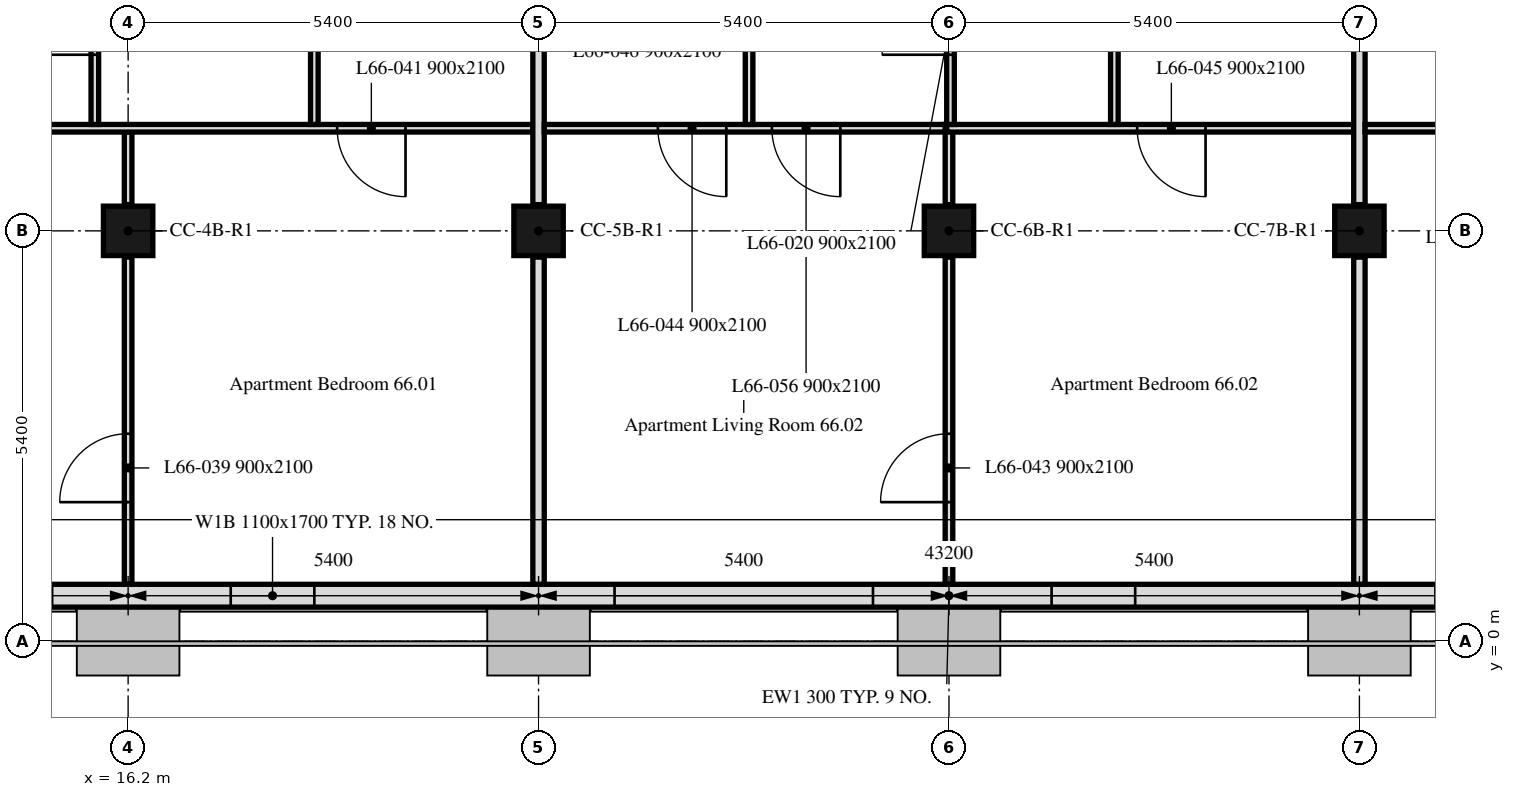
"""IFC4 building model, lengths in metres.
Left out: names, types, materials, properties, quantities, classifications, styles, units other than length and angle.
Written with IfcOpenShell. Run it as: python <this file> out.ifc"""

import sys

from ifc_helpers import new_model, si_unit, direction, frame, frame_2d, origin, origin_2d, place, context, subcontext, project, spatial, rectangle, extrude, element, fill, save


model = new_model("IFC4")
c1 = context("Model", 3, precision=1e-05, world=origin(), true_north=direction((0.0, 1.0)))
c2 = subcontext(c1, "Body", "Model", "MODEL_VIEW")
j1 = project(units=[si_unit("LENGTHUNIT", "METRE"), si_unit("PLANEANGLEUNIT", "RADIAN")], contexts=[c1])
p1 = place(None, origin())
s1 = spatial("IfcSite", under=j1, at=p1, CompositionType="ELEMENT")
p2 = place(p1, origin())
s2 = spatial("IfcBuilding", under=s1, at=p2, CompositionType="ELEMENT")
p3 = place(p2, frame((0.0, 0.0, 271.9)))
s3 = spatial("IfcBuildingStorey", under=s2, at=p3, CompositionType="ELEMENT", Elevation=271.9)
for number, where, z_axis, x_axis in (
    (1, (16.2, 5.4, 0.0), (0.0, 0.0, 1.0), (1.0, 0.0, 0.0)),
    (2, (21.6, 5.4, 0.0), (0.0, 0.0, 1.0), (1.0, 0.0, 0.0)),
    (3, (27.0, 5.4, 0.0), (0.0, 0.0, 1.0), (1.0, 0.0, 0.0)),
    (4, (32.4, 5.4, 0.0), (0.0, 0.0, 1.0), (1.0, 0.0, 0.0)),
):
    element("IfcColumn", number, at=place(p3, frame(where, z_axis=z_axis, x_axis=x_axis)), inside=s3, PredefinedType="COLUMN", context=c2, shape_type="SweptSolid", body=[
        extrude(rectangle(XDim=0.65, YDim=0.65, at=origin_2d()), origin(), (0.0, 0.0, 1.0), 3.0),
    ])
p4 = place(p3, frame((10.986, 0.6, 0.0), z_axis=(0.0, 0.0, 1.0), x_axis=(1.0, 0.0, 0.0)))
e5 = element("IfcWall", 5, at=p4, inside=s3, PredefinedType="SOLIDWALL", context=c2, shape_type="SweptSolid", body=[
    extrude(rectangle(XDim=32.027, YDim=0.3, at=frame_2d((16.014, 0.0))), origin(), (0.0, 0.0, 1.0), 3.0),
])
p5 = place(p4, frame((0.814, 0.0, 0.9)))
e6 = element("IfcOpeningElement", 6, at=p5, cuts=e5, PredefinedType="OPENING", context=c2, shape_type="SweptSolid", body=[
    extrude(rectangle(XDim=3.4, YDim=1.7, at=frame_2d((1.7, 0.85))), frame((0.0, 0.16, 0.0), z_axis=(0.0, -1.0, 0.0), x_axis=(1.0, 0.0, 0.0)), (0.0, 0.0, 1.0), 0.32),
])
p6 = place(p4, frame((6.564, 0.0, 0.9)))
e7 = element("IfcOpeningElement", 7, at=p6, cuts=e5, PredefinedType="OPENING", context=c2, shape_type="SweptSolid", body=[
    extrude(rectangle(XDim=1.1, YDim=1.7, at=frame_2d((0.55, 0.85))), frame((0.0, 0.16, 0.0), z_axis=(0.0, -1.0, 0.0), x_axis=(1.0, 0.0, 0.0)), (0.0, 0.0, 1.0), 0.32),
])
p7 = place(p4, frame((11.614, 0.0, 0.9)))
e8 = element("IfcOpeningElement", 8, at=p7, cuts=e5, PredefinedType="OPENING", context=c2, shape_type="SweptSolid", body=[
    extrude(rectangle(XDim=3.4, YDim=1.7, at=frame_2d((1.7, 0.85))), frame((0.0, 0.16, 0.0), z_axis=(0.0, -1.0, 0.0), x_axis=(1.0, 0.0, 0.0)), (0.0, 0.0, 1.0), 0.32),
])
p8 = place(p4, frame((17.364, 0.0, 0.9)))
e9 = element("IfcOpeningElement", 9, at=p8, cuts=e5, PredefinedType="OPENING", context=c2, shape_type="SweptSolid", body=[
    extrude(rectangle(XDim=1.1, YDim=1.7, at=frame_2d((0.55, 0.85))), frame((0.0, 0.16, 0.0), z_axis=(0.0, -1.0, 0.0), x_axis=(1.0, 0.0, 0.0)), (0.0, 0.0, 1.0), 0.32),
])
p9 = place(p4, frame((22.414, 0.0, 0.9)))
e10 = element("IfcOpeningElement", 10, at=p9, cuts=e5, PredefinedType="OPENING", context=c2, shape_type="SweptSolid", body=[
    extrude(rectangle(XDim=3.4, YDim=1.7, at=frame_2d((1.7, 0.85))), frame((0.0, 0.16, 0.0), z_axis=(0.0, -1.0, 0.0), x_axis=(1.0, 0.0, 0.0)), (0.0, 0.0, 1.0), 0.32),
])
p10 = place(p4, frame((28.164, 0.0, 0.9)))
e11 = element("IfcOpeningElement", 11, at=p10, cuts=e5, PredefinedType="OPENING", context=c2, shape_type="SweptSolid", body=[
    extrude(rectangle(XDim=1.1, YDim=1.7, at=frame_2d((0.55, 0.85))), frame((0.0, 0.16, 0.0), z_axis=(0.0, -1.0, 0.0), x_axis=(1.0, 0.0, 0.0)), (0.0, 0.0, 1.0), 0.32),
])
p11 = place(p3, frame((16.2, 0.751, 0.0), z_axis=(0.0, 0.0, 1.0), x_axis=(0.0, 1.0, 0.0)))
e12 = element("IfcWall", 12, at=p11, inside=s3, PredefinedType="PARTITIONING", context=c2, shape_type="SweptSolid", body=[
    extrude(rectangle(XDim=4.304, YDim=0.1, at=frame_2d((2.152, 0.0))), origin(), (0.0, 0.0, 1.0), 2.4),
])
p12 = place(p11, frame((1.08, 0.0, 0.0)))
e13 = element("IfcOpeningElement", 13, at=p12, cuts=e12, PredefinedType="OPENING", context=c2, shape_type="SweptSolid", body=[
    extrude(rectangle(XDim=0.9, YDim=2.1, at=frame_2d((0.45, 1.05))), frame((0.0, 0.05, 0.0), z_axis=(0.0, -1.0, 0.0), x_axis=(1.0, 0.0, 0.0)), (0.0, 0.0, 1.0), 0.1),
])
p13 = place(p3, frame((16.2, 5.745, 0.0), z_axis=(0.0, 0.0, 1.0), x_axis=(0.0, 1.0, 0.0)))
e14 = element("IfcWall", 14, at=p13, inside=s3, PredefinedType="PARTITIONING", context=c2, shape_type="SweptSolid", body=[
    extrude(rectangle(XDim=0.955, YDim=0.1, at=frame_2d((0.478, 0.0))), origin(), (0.0, 0.0, 1.0), 2.4),
])
p14 = place(p3, frame((21.525, 6.75, 0.0), z_axis=(0.0, 0.0, 1.0), x_axis=(-1.0, 0.0, 0.0)))
e15 = element("IfcWall", 15, at=p14, inside=s3, PredefinedType="PARTITIONING", context=c2, shape_type="SweptSolid", body=[
    extrude(rectangle(XDim=10.65, YDim=0.1, at=frame_2d((5.325, 0.0))), origin(), (0.0, 0.0, 1.0), 2.4),
])
p15 = place(p14, frame((8.813, 0.0, 0.0)))
e16 = element("IfcOpeningElement", 16, at=p15, cuts=e15, PredefinedType="OPENING", context=c2, shape_type="SweptSolid", body=[
    extrude(rectangle(XDim=0.9, YDim=2.1, at=frame_2d((0.45, 1.05))), frame((0.0, 0.05, 0.0), z_axis=(0.0, -1.0, 0.0), x_axis=(1.0, 0.0, 0.0)), (0.0, 0.0, 1.0), 0.1),
])
p16 = place(p14, frame((1.675, 0.0, 0.0)))
e17 = element("IfcOpeningElement", 17, at=p16, cuts=e15, PredefinedType="OPENING", context=c2, shape_type="SweptSolid", body=[
    extrude(rectangle(XDim=0.9, YDim=2.1, at=frame_2d((0.45, 1.05))), frame((0.0, 0.05, 0.0), z_axis=(0.0, -1.0, 0.0), x_axis=(1.0, 0.0, 0.0)), (0.0, 0.0, 1.0), 0.1),
])
p17 = place(p14, frame((7.313, 0.0, 0.0)))
e18 = element("IfcOpeningElement", 18, at=p17, cuts=e15, PredefinedType="OPENING", context=c2, shape_type="SweptSolid", body=[
    extrude(rectangle(XDim=0.9, YDim=2.1, at=frame_2d((0.45, 1.05))), frame((0.0, 0.05, 0.0), z_axis=(0.0, -1.0, 0.0), x_axis=(1.0, 0.0, 0.0)), (0.0, 0.0, 1.0), 0.1),
])
p18 = place(p3, frame((21.6, 0.751, 0.0), z_axis=(0.0, 0.0, 1.0), x_axis=(0.0, 1.0, 0.0)))
e19 = element("IfcWall", 19, at=p18, inside=s3, PredefinedType="PARTITIONING", context=c2, shape_type="SweptSolid", body=[
    extrude(rectangle(XDim=4.304, YDim=0.15, at=frame_2d((2.152, 0.0))), origin(), (0.0, 0.0, 1.0), 2.4),
])
p19 = place(p3, frame((15.762, 6.8, 0.0), z_axis=(0.0, 0.0, 1.0), x_axis=(0.0, 1.0, 0.0)))
e20 = element("IfcWall", 20, at=p19, inside=s3, PredefinedType="PARTITIONING", context=c2, shape_type="SweptSolid", body=[
    extrude(rectangle(XDim=7.075, YDim=0.1, at=frame_2d((3.538, 0.0))), origin(), (0.0, 0.0, 1.0), 3.0),
])
p20 = place(p19, frame((0.917, 0.0, 0.0)))
e21 = element("IfcOpeningElement", 21, at=p20, cuts=e20, PredefinedType="OPENING", context=c2, shape_type="SweptSolid", body=[
    extrude(rectangle(XDim=0.9, YDim=2.1, at=frame_2d((0.45, 1.05))), frame((0.0, 0.05, 0.0), z_axis=(0.0, -1.0, 0.0), x_axis=(1.0, 0.0, 0.0)), (0.0, 0.0, 1.0), 0.1),
])
p21 = place(p19, frame((5.925, 0.0, 0.0)))
e22 = element("IfcOpeningElement", 22, at=p21, cuts=e20, PredefinedType="OPENING", context=c2, shape_type="SweptSolid", body=[
    extrude(rectangle(XDim=0.9, YDim=2.1, at=frame_2d((0.45, 1.05))), frame((0.0, 0.05, 0.0), z_axis=(0.0, -1.0, 0.0), x_axis=(1.0, 0.0, 0.0)), (0.0, 0.0, 1.0), 0.1),
])
p22 = place(p3, frame((18.65, 6.8, 0.0), z_axis=(0.0, 0.0, 1.0), x_axis=(0.0, 1.0, 0.0)))
e23 = element("IfcWall", 23, at=p22, inside=s3, PredefinedType="PARTITIONING", context=c2, shape_type="SweptSolid", body=[
    extrude(rectangle(XDim=7.075, YDim=0.1, at=frame_2d((3.538, 0.0))), origin(), (0.0, 0.0, 1.0), 3.0),
])
p23 = place(p3, frame((21.6, 5.745, 0.0), z_axis=(0.0, 0.0, 1.0), x_axis=(0.0, 1.0, 0.0)))
e24 = element("IfcWall", 24, at=p23, inside=s3, PredefinedType="PARTITIONING", context=c2, shape_type="SweptSolid", body=[
    extrude(rectangle(XDim=4.71, YDim=0.15, at=frame_2d((2.355, 0.0))), origin(), (0.0, 0.0, 1.0), 2.4),
])
p24 = place(p3, frame((27.0, 0.751, 0.0), z_axis=(0.0, 0.0, 1.0), x_axis=(0.0, 1.0, 0.0)))
e25 = element("IfcWall", 25, at=p24, inside=s3, PredefinedType="PARTITIONING", context=c2, shape_type="SweptSolid", body=[
    extrude(rectangle(XDim=4.304, YDim=0.1, at=frame_2d((2.152, 0.0))), origin(), (0.0, 0.0, 1.0), 2.4),
])
p25 = place(p24, frame((1.08, 0.0, 0.0)))
e26 = element("IfcOpeningElement", 26, at=p25, cuts=e25, PredefinedType="OPENING", context=c2, shape_type="SweptSolid", body=[
    extrude(rectangle(XDim=0.9, YDim=2.1, at=frame_2d((0.45, 1.05))), frame((0.0, 0.05, 0.0), z_axis=(0.0, -1.0, 0.0), x_axis=(1.0, 0.0, 0.0)), (0.0, 0.0, 1.0), 0.1),
])
p26 = place(p3, frame((27.0, 5.745, 0.0), z_axis=(0.0, 0.0, 1.0), x_axis=(0.0, 1.0, 0.0)))
e27 = element("IfcWall", 27, at=p26, inside=s3, PredefinedType="PARTITIONING", context=c2, shape_type="SweptSolid", body=[
    extrude(rectangle(XDim=1.055, YDim=0.1, at=frame_2d((0.527, 0.0))), origin(), (0.0, 0.0, 1.0), 2.4),
])
p27 = place(p3, frame((26.95, 6.75, 0.0), z_axis=(0.0, 0.0, 1.0), x_axis=(-1.0, 0.0, 0.0)))
e28 = element("IfcWall", 28, at=p27, inside=s3, PredefinedType="PARTITIONING", context=c2, shape_type="SweptSolid", body=[
    extrude(rectangle(XDim=5.275, YDim=0.1, at=frame_2d((2.637, 0.0))), origin(), (0.0, 0.0, 1.0), 3.0),
])
p28 = place(p27, frame((2.88, 0.0, 0.0)))
e29 = element("IfcOpeningElement", 29, at=p28, cuts=e28, PredefinedType="OPENING", context=c2, shape_type="SweptSolid", body=[
    extrude(rectangle(XDim=0.9, YDim=2.1, at=frame_2d((0.45, 1.05))), frame((0.0, 0.05, 0.0), z_axis=(0.0, -1.0, 0.0), x_axis=(1.0, 0.0, 0.0)), (0.0, 0.0, 1.0), 0.1),
])
p29 = place(p27, frame((1.38, 0.0, 0.0)))
e30 = element("IfcOpeningElement", 30, at=p29, cuts=e28, PredefinedType="OPENING", context=c2, shape_type="SweptSolid", body=[
    extrude(rectangle(XDim=0.9, YDim=2.1, at=frame_2d((0.45, 1.05))), frame((0.0, 0.05, 0.0), z_axis=(0.0, -1.0, 0.0), x_axis=(1.0, 0.0, 0.0)), (0.0, 0.0, 1.0), 0.1),
])
p30 = place(p3, frame((32.4, 0.751, 0.0), z_axis=(0.0, 0.0, 1.0), x_axis=(0.0, 1.0, 0.0)))
e31 = element("IfcWall", 31, at=p30, inside=s3, PredefinedType="PARTITIONING", context=c2, shape_type="SweptSolid", body=[
    extrude(rectangle(XDim=4.304, YDim=0.15, at=frame_2d((2.152, 0.0))), origin(), (0.0, 0.0, 1.0), 2.4),
])
p31 = place(p3, frame((32.325, 6.75, 0.0), z_axis=(0.0, 0.0, 1.0), x_axis=(-1.0, 0.0, 0.0)))
e32 = element("IfcWall", 32, at=p31, inside=s3, PredefinedType="PARTITIONING", context=c2, shape_type="SweptSolid", body=[
    extrude(rectangle(XDim=5.355, YDim=0.1, at=frame_2d((2.677, 0.0))), origin(), (0.0, 0.0, 1.0), 3.0),
])
p32 = place(p31, frame((1.949, 0.0, 0.0)))
e33 = element("IfcOpeningElement", 33, at=p32, cuts=e32, PredefinedType="OPENING", context=c2, shape_type="SweptSolid", body=[
    extrude(rectangle(XDim=0.9, YDim=2.1, at=frame_2d((0.45, 1.05))), frame((0.0, 0.05, 0.0), z_axis=(0.0, -1.0, 0.0), x_axis=(1.0, 0.0, 0.0)), (0.0, 0.0, 1.0), 0.1),
])
p33 = place(p3, frame((24.37, 6.8, 0.0), z_axis=(0.0, 0.0, 1.0), x_axis=(0.0, 1.0, 0.0)))
e34 = element("IfcWall", 34, at=p33, inside=s3, PredefinedType="PARTITIONING", context=c2, shape_type="SweptSolid", body=[
    extrude(rectangle(XDim=7.075, YDim=0.1, at=frame_2d((3.538, 0.0))), origin(), (0.0, 0.0, 1.0), 3.0),
])
p34 = place(p33, frame((5.45, 0.0, 0.0)))
e35 = element("IfcOpeningElement", 35, at=p34, cuts=e34, PredefinedType="OPENING", context=c2, shape_type="SweptSolid", body=[
    extrude(rectangle(XDim=0.9, YDim=2.1, at=frame_2d((0.45, 1.05))), frame((0.0, 0.05, 0.0), z_axis=(0.0, -1.0, 0.0), x_axis=(1.0, 0.0, 0.0)), (0.0, 0.0, 1.0), 0.1),
])
p35 = place(p33, frame((1.85, 0.0, 0.0)))
e36 = element("IfcOpeningElement", 36, at=p35, cuts=e34, PredefinedType="OPENING", context=c2, shape_type="SweptSolid", body=[
    extrude(rectangle(XDim=0.9, YDim=2.1, at=frame_2d((0.45, 1.05))), frame((0.0, 0.05, 0.0), z_axis=(0.0, -1.0, 0.0), x_axis=(1.0, 0.0, 0.0)), (0.0, 0.0, 1.0), 0.1),
])
p36 = place(p3, frame((27.02, 6.8, 0.0), z_axis=(0.0, 0.0, 1.0), x_axis=(0.0, 1.0, 0.0)))
e37 = element("IfcWall", 37, at=p36, inside=s3, PredefinedType="PARTITIONING", context=c2, shape_type="SweptSolid", body=[
    extrude(rectangle(XDim=3.655, YDim=0.1, at=frame_2d((1.828, 0.0))), origin(), (0.0, 0.0, 1.0), 2.4),
])
p37 = place(p36, frame((0.917, 0.0, 0.0)))
e38 = element("IfcOpeningElement", 38, at=p37, cuts=e37, PredefinedType="OPENING", context=c2, shape_type="SweptSolid", body=[
    extrude(rectangle(XDim=0.9, YDim=2.1, at=frame_2d((0.45, 1.05))), frame((0.0, 0.05, 0.0), z_axis=(0.0, -1.0, 0.0), x_axis=(1.0, 0.0, 0.0)), (0.0, 0.0, 1.0), 0.1),
])
p38 = place(p3, frame((29.176, 6.8, 0.0), z_axis=(0.0, 0.0, 1.0), x_axis=(0.0, 1.0, 0.0)))
e39 = element("IfcWall", 39, at=p38, inside=s3, PredefinedType="PARTITIONING", context=c2, shape_type="SweptSolid", body=[
    extrude(rectangle(XDim=7.075, YDim=0.1, at=frame_2d((3.538, 0.0))), origin(), (0.0, 0.0, 1.0), 3.0),
])
p39 = place(p3, frame((32.4, 5.745, 0.0), z_axis=(0.0, 0.0, 1.0), x_axis=(0.0, 1.0, 0.0)))
e40 = element("IfcWall", 40, at=p39, inside=s3, PredefinedType="PARTITIONING", context=c2, shape_type="SweptSolid", body=[
    extrude(rectangle(XDim=4.71, YDim=0.15, at=frame_2d((2.355, 0.0))), origin(), (0.0, 0.0, 1.0), 2.4),
])
p40 = place(p3, frame((47.849, 6.75, 0.0), z_axis=(0.0, 0.0, 1.0), x_axis=(-1.0, 0.0, 0.0)))
e41 = element("IfcWall", 41, at=p40, inside=s3, PredefinedType="PARTITIONING", context=c2, shape_type="SweptSolid", body=[
    extrude(rectangle(XDim=15.374, YDim=0.1, at=frame_2d((7.687, 0.0))), origin(), (0.0, 0.0, 1.0), 2.4),
])
p41 = place(p40, frame((0.929, 0.0, 0.0)))
e42 = element("IfcOpeningElement", 42, at=p41, cuts=e41, PredefinedType="OPENING", context=c2, shape_type="SweptSolid", body=[
    extrude(rectangle(XDim=0.9, YDim=2.1, at=frame_2d((0.45, 1.05))), frame((0.0, 0.05, 0.0), z_axis=(0.0, -1.0, 0.0), x_axis=(1.0, 0.0, 0.0)), (0.0, 0.0, 1.0), 0.1),
])
p42 = place(p40, frame((13.149, 0.0, 0.0)))
e43 = element("IfcOpeningElement", 43, at=p42, cuts=e41, PredefinedType="OPENING", context=c2, shape_type="SweptSolid", body=[
    extrude(rectangle(XDim=0.9, YDim=2.1, at=frame_2d((0.45, 1.05))), frame((0.0, 0.05, 0.0), z_axis=(0.0, -1.0, 0.0), x_axis=(1.0, 0.0, 0.0)), (0.0, 0.0, 1.0), 0.1),
])
p43 = place(p40, frame((2.874, 0.0, 0.0)))
e44 = element("IfcOpeningElement", 44, at=p43, cuts=e41, PredefinedType="OPENING", context=c2, shape_type="SweptSolid", body=[
    extrude(rectangle(XDim=0.9, YDim=2.1, at=frame_2d((0.45, 1.05))), frame((0.0, 0.05, 0.0), z_axis=(0.0, -1.0, 0.0), x_axis=(1.0, 0.0, 0.0)), (0.0, 0.0, 1.0), 0.1),
])
p44 = place(p40, frame((8.463, 0.0, 0.0)))
e45 = element("IfcOpeningElement", 45, at=p44, cuts=e41, PredefinedType="OPENING", context=c2, shape_type="SweptSolid", body=[
    extrude(rectangle(XDim=0.9, YDim=2.1, at=frame_2d((0.45, 1.05))), frame((0.0, 0.05, 0.0), z_axis=(0.0, -1.0, 0.0), x_axis=(1.0, 0.0, 0.0)), (0.0, 0.0, 1.0), 0.1),
])
p45 = place(p6, origin())
e46 = element("IfcWindow", 46, at=p45, inside=s3, PartitioningType="SINGLE_PANEL", PredefinedType="WINDOW", context=c2, shape_type="SweptSolid", body=[
    extrude(rectangle(XDim=1.1, YDim=1.7, at=frame_2d((0.55, 0.85))), frame((0.0, 0.03, 0.0), z_axis=(0.0, -1.0, 0.0), x_axis=(1.0, 0.0, 0.0)), (0.0, 0.0, 1.0), 0.06),
])
fill(e7, e46)
p46 = place(p7, origin())
e47 = element("IfcWindow", 47, at=p46, inside=s3, PartitioningType="SINGLE_PANEL", PredefinedType="WINDOW", context=c2, shape_type="SweptSolid", body=[
    extrude(rectangle(XDim=3.4, YDim=1.7, at=frame_2d((1.7, 0.85))), frame((0.0, 0.03, 0.0), z_axis=(0.0, -1.0, 0.0), x_axis=(1.0, 0.0, 0.0)), (0.0, 0.0, 1.0), 0.06),
])
fill(e8, e47)
p47 = place(p8, origin())
e48 = element("IfcWindow", 48, at=p47, inside=s3, PartitioningType="SINGLE_PANEL", PredefinedType="WINDOW", context=c2, shape_type="SweptSolid", body=[
    extrude(rectangle(XDim=1.1, YDim=1.7, at=frame_2d((0.55, 0.85))), frame((0.0, 0.03, 0.0), z_axis=(0.0, -1.0, 0.0), x_axis=(1.0, 0.0, 0.0)), (0.0, 0.0, 1.0), 0.06),
])
fill(e9, e48)
p48 = place(p20, origin())
e49 = element("IfcDoor", 49, at=p48, inside=s3, OperationType="SINGLE_SWING_RIGHT", PredefinedType="DOOR", context=c2, shape_type="SweptSolid", body=[
    extrude(rectangle(XDim=0.9, YDim=2.1, at=frame_2d((0.45, 1.05))), frame((0.0, 0.025, 0.0), z_axis=(0.0, -1.0, 0.0), x_axis=(1.0, 0.0, 0.0)), (0.0, 0.0, 1.0), 0.05),
])
fill(e21, e49)
p49 = place(p37, origin())
e50 = element("IfcDoor", 50, at=p49, inside=s3, OperationType="SINGLE_SWING_LEFT", PredefinedType="DOOR", context=c2, shape_type="SweptSolid", body=[
    extrude(rectangle(XDim=0.9, YDim=2.1, at=frame_2d((0.45, 1.05))), frame((0.0, 0.025, 0.0), z_axis=(0.0, -1.0, 0.0), x_axis=(1.0, 0.0, 0.0)), (0.0, 0.0, 1.0), 0.05),
])
fill(e38, e50)
p50 = place(p12, origin())
e51 = element("IfcDoor", 51, at=p50, inside=s3, OperationType="SINGLE_SWING_LEFT", PredefinedType="DOOR", context=c2, shape_type="SweptSolid", body=[
    extrude(rectangle(XDim=0.9, YDim=2.1, at=frame_2d((0.45, 1.05))), frame((0.0, 0.025, 0.0), z_axis=(0.0, -1.0, 0.0), x_axis=(1.0, 0.0, 0.0)), (0.0, 0.0, 1.0), 0.05),
])
fill(e13, e51)
p51 = place(p16, origin())
e52 = element("IfcDoor", 52, at=p51, inside=s3, OperationType="SINGLE_SWING_LEFT", PredefinedType="DOOR", context=c2, shape_type="SweptSolid", body=[
    extrude(rectangle(XDim=0.9, YDim=2.1, at=frame_2d((0.45, 1.05))), frame((0.0, 0.025, 0.0), z_axis=(0.0, -1.0, 0.0), x_axis=(1.0, 0.0, 0.0)), (0.0, 0.0, 1.0), 0.05),
])
fill(e17, e52)
p52 = place(p25, origin())
e53 = element("IfcDoor", 53, at=p52, inside=s3, OperationType="SINGLE_SWING_RIGHT", PredefinedType="DOOR", context=c2, shape_type="SweptSolid", body=[
    extrude(rectangle(XDim=0.9, YDim=2.1, at=frame_2d((0.45, 1.05))), frame((0.0, 0.025, 0.0), z_axis=(0.0, -1.0, 0.0), x_axis=(1.0, 0.0, 0.0)), (0.0, 0.0, 1.0), 0.05),
])
fill(e26, e53)
p53 = place(p28, origin())
e54 = element("IfcDoor", 54, at=p53, inside=s3, OperationType="SINGLE_SWING_RIGHT", PredefinedType="DOOR", context=c2, shape_type="SweptSolid", body=[
    extrude(rectangle(XDim=0.9, YDim=2.1, at=frame_2d((0.45, 1.05))), frame((0.0, 0.025, 0.0), z_axis=(0.0, -1.0, 0.0), x_axis=(1.0, 0.0, 0.0)), (0.0, 0.0, 1.0), 0.05),
])
fill(e29, e54)
p54 = place(p32, origin())
e55 = element("IfcDoor", 55, at=p54, inside=s3, OperationType="SINGLE_SWING_LEFT", PredefinedType="DOOR", context=c2, shape_type="SweptSolid", body=[
    extrude(rectangle(XDim=0.9, YDim=2.1, at=frame_2d((0.45, 1.05))), frame((0.0, 0.025, 0.0), z_axis=(0.0, -1.0, 0.0), x_axis=(1.0, 0.0, 0.0)), (0.0, 0.0, 1.0), 0.05),
])
fill(e33, e55)
p55 = place(p29, origin())
e56 = element("IfcDoor", 56, at=p55, inside=s3, OperationType="SINGLE_SWING_LEFT", PredefinedType="DOOR", context=c2, shape_type="SweptSolid", body=[
    extrude(rectangle(XDim=0.9, YDim=2.1, at=frame_2d((0.45, 1.05))), frame((0.0, 0.025, 0.0), z_axis=(0.0, -1.0, 0.0), x_axis=(1.0, 0.0, 0.0)), (0.0, 0.0, 1.0), 0.05),
])
fill(e30, e56)
save(model, sys.argv[1])
